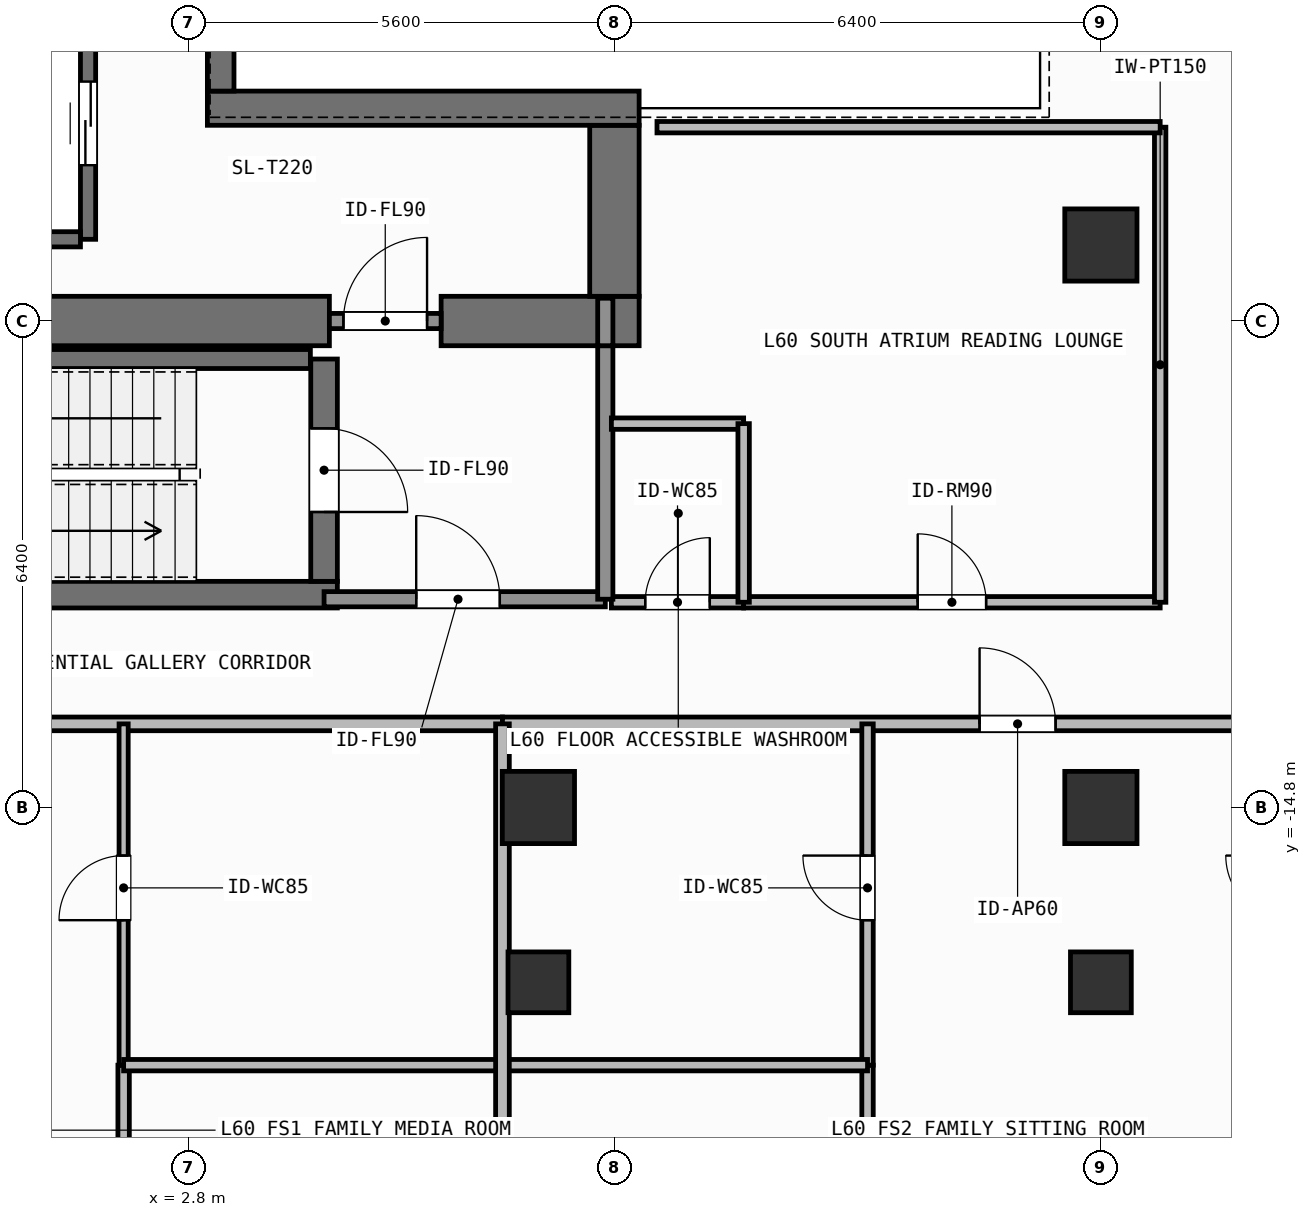
"""IFC4 building model, lengths in metres.
Left out: names, types, materials, properties, quantities, classifications, styles, units other than length and angle.
Written with IfcOpenShell. Run it as: python <this file> out.ifc"""

import sys

from ifc_helpers import new_model, si_unit, direction, frame, frame_2d, origin, origin_2d, place, context, subcontext, project, spatial, rectangle, hollow_rectangle, extrude, element, fill, save


model = new_model("IFC4")
c1 = context("Model", 3, precision=1e-05, world=origin(), true_north=direction((0.0, 1.0)))
c2 = subcontext(c1, "Body", "Model", "MODEL_VIEW")
j1 = project(units=[si_unit("LENGTHUNIT", "METRE"), si_unit("PLANEANGLEUNIT", "RADIAN")], contexts=[c1])
p1 = place(None, origin())
s1 = spatial("IfcSite", under=j1, at=p1, CompositionType="ELEMENT")
p2 = place(p1, origin())
s2 = spatial("IfcBuilding", under=s1, at=p2, CompositionType="ELEMENT")
p3 = place(p2, frame((0.0, 0.0, 246.9)))
s3 = spatial("IfcBuildingStorey", under=s2, at=p3, CompositionType="ELEMENT", Elevation=246.9)
p4 = place(p3, frame((-2.62, -8.4, 0.0), z_axis=(0.0, 0.0, 1.0), x_axis=(1.0, 0.0, 0.0)))
e1 = element("IfcWall", 1, at=p4, inside=s3, PredefinedType="SHEAR", context=c2, shape_type="SweptSolid", body=[
    extrude(rectangle(XDim=7.27, YDim=0.65, at=frame_2d((3.635, 0.0))), origin(), (0.0, 0.0, 1.0), 3.9),
])
p5 = place(p3, frame((6.12, -8.4, 0.0), z_axis=(0.0, 0.0, 1.0), x_axis=(1.0, 0.0, 0.0)))
e2 = element("IfcWall", 2, at=p5, inside=s3, PredefinedType="SHEAR", context=c2, shape_type="SweptSolid", body=[
    extrude(rectangle(XDim=2.605, YDim=0.65, at=frame_2d((1.302, 0.0))), origin(), (0.0, 0.0, 1.0), 3.9),
])
p6 = place(p3, frame((8.4, -8.075, 0.0), z_axis=(0.0, 0.0, 1.0), x_axis=(0.0, 1.0, 0.0)))
e3 = element("IfcWall", 3, at=p6, inside=s3, PredefinedType="SHEAR", context=c2, shape_type="SweptSolid", body=[
    extrude(rectangle(XDim=2.25, YDim=0.65, at=frame_2d((1.125, 0.0))), origin(), (0.0, 0.0, 1.0), 3.9),
])
p7 = place(p3, frame((3.045, -5.6, 0.0), z_axis=(0.0, 0.0, 1.0), x_axis=(1.0, 0.0, 0.0)))
e4 = element("IfcWall", 4, at=p7, inside=s3, PredefinedType="SHEAR", context=c2, shape_type="SweptSolid", body=[
    extrude(rectangle(XDim=5.68, YDim=0.45, at=frame_2d((2.84, 0.0))), origin(), (0.0, 0.0, 1.0), 3.9),
])
p8 = place(p3, frame((3.22, -5.375, 0.0), z_axis=(0.0, 0.0, 1.0), x_axis=(0.0, 1.0, 0.0)))
e5 = element("IfcWall", 5, at=p8, inside=s3, PredefinedType="SHEAR", context=c2, shape_type="SweptSolid", body=[
    extrude(rectangle(XDim=10.75, YDim=0.35, at=frame_2d((5.375, 0.0))), origin(), (0.0, 0.0, 1.0), 3.9),
])
p9 = place(p3, frame((-2.555, -12.0, 0.0), z_axis=(0.0, 0.0, 1.0), x_axis=(1.0, 0.0, 0.0)))
e6 = element("IfcWall", 6, at=p9, inside=s3, PredefinedType="SHEAR", context=c2, shape_type="SweptSolid", body=[
    extrude(rectangle(XDim=7.31, YDim=0.35, at=frame_2d((3.655, 0.0))), origin(), (0.0, 0.0, 1.0), 3.9),
])
p10 = place(p3, frame((-2.2, -8.9, 0.0), z_axis=(0.0, 0.0, 1.0), x_axis=(1.0, 0.0, 0.0)))
e7 = element("IfcWall", 7, at=p10, inside=s3, PredefinedType="SHEAR", context=c2, shape_type="SweptSolid", body=[
    extrude(rectangle(XDim=6.6, YDim=0.25, at=frame_2d((3.3, 0.0))), origin(), (0.0, 0.0, 1.0), 3.9),
])
p11 = place(p3, frame((4.58, -8.9, 0.0), z_axis=(0.0, 0.0, 1.0), x_axis=(0.0, -1.0, 0.0)))
e8 = element("IfcWall", 8, at=p11, inside=s3, PredefinedType="SHEAR", context=c2, shape_type="SweptSolid", body=[
    extrude(rectangle(XDim=2.925, YDim=0.35, at=frame_2d((1.462, 0.0))), origin(), (0.0, 0.0, 1.0), 3.9),
])
p12 = place(p11, frame((0.913, 0.0, 0.0)))
e9 = element("IfcOpeningElement", 9, at=p12, cuts=e8, PredefinedType="OPENING", context=c2, shape_type="SweptSolid", body=[
    extrude(rectangle(XDim=1.1, YDim=2.15, at=frame_2d((0.55, 1.075))), frame((0.0, 0.185, 0.0), z_axis=(0.0, -1.0, 0.0), x_axis=(1.0, 0.0, 0.0)), (0.0, 0.0, 1.0), 0.37),
])
for number, where, z_axis, x_axis in (
    (10, (7.4, -14.8, 0.0), (0.0, 0.0, 1.0), (1.0, 0.0, 0.0)),
    (11, (14.8, -14.8, 0.0), (0.0, 0.0, 1.0), (1.0, 0.0, 0.0)),
    (12, (14.8, -7.4, 0.0), (0.0, 0.0, 1.0), (1.0, 0.0, 0.0)),
):
    element("IfcColumn", number, at=place(p3, frame(where, z_axis=z_axis, x_axis=x_axis)), inside=s3, PredefinedType="COLUMN", context=c2, shape_type="SweptSolid", body=[
        extrude(rectangle(XDim=0.95, YDim=0.95, at=origin_2d()), origin(), (0.0, 0.0, 1.0), 3.9),
    ])
for number, where, z_axis, x_axis in (
    (13, (7.4, -17.1, 0.0), (0.0, 0.0, 1.0), (1.0, 0.0, 0.0)),
    (14, (14.8, -17.1, 0.0), (0.0, 0.0, 1.0), (1.0, 0.0, 0.0)),
):
    element("IfcColumn", number, at=place(p3, frame(where, z_axis=z_axis, x_axis=x_axis)), inside=s3, PredefinedType="COLUMN", context=c2, shape_type="SweptSolid", body=[
        extrude(hollow_rectangle(XDim=0.8, YDim=0.8, WallThickness=0.036, at=origin_2d()), origin(), (0.0, 0.0, 1.0), 3.9),
    ])
p13 = place(p3, frame((1.475, -7.325, 0.0), z_axis=(0.0, 0.0, 1.0), x_axis=(0.0, 1.0, 0.0)))
e15 = element("IfcWall", 15, at=p13, inside=s3, PredefinedType="SHEAR", context=c2, shape_type="SweptSolid", body=[
    extrude(rectangle(XDim=3.05, YDim=0.2, at=frame_2d((1.525, 0.0))), origin(), (0.0, 0.0, 1.0), 3.68),
])
p14 = place(p13, frame((0.975, 0.0, 0.0)))
e16 = element("IfcOpeningElement", 16, at=p14, cuts=e15, PredefinedType="OPENING", context=c2, shape_type="SweptSolid", body=[
    extrude(rectangle(XDim=1.1, YDim=2.2, at=frame_2d((0.55, 1.1))), frame((0.0, 0.11, 0.0), z_axis=(0.0, -1.0, 0.0), x_axis=(1.0, 0.0, 0.0)), (0.0, 0.0, 1.0), 0.22),
])
p15 = place(p3, frame((-0.975, -7.325, 0.0), z_axis=(0.0, 0.0, 1.0), x_axis=(1.0, 0.0, 0.0)))
e17 = element("IfcWall", 17, at=p15, inside=s3, PredefinedType="SHEAR", context=c2, shape_type="SweptSolid", body=[
    extrude(rectangle(XDim=2.35, YDim=0.2, at=frame_2d((1.175, 0.0))), origin(), (0.0, 0.0, 1.0), 3.68),
])
p16 = place(p3, frame((4.58, -12.06, 0.0), z_axis=(0.0, 0.0, 1.0), x_axis=(1.0, 0.0, 0.0)))
e18 = element("IfcWall", 18, at=p16, inside=s3, PredefinedType="SOLIDWALL", context=c2, shape_type="SweptSolid", body=[
    extrude(rectangle(XDim=3.7, YDim=0.2, at=frame_2d((1.85, 0.0))), origin(), (0.0, 0.0, 1.0), 3.68),
])
p17 = place(p16, frame((1.212, 0.0, 0.0)))
e19 = element("IfcOpeningElement", 19, at=p17, cuts=e18, PredefinedType="OPENING", context=c2, shape_type="SweptSolid", body=[
    extrude(rectangle(XDim=1.1, YDim=2.15, at=frame_2d((0.55, 1.075))), frame((0.0, 0.11, 0.0), z_axis=(0.0, -1.0, 0.0), x_axis=(1.0, 0.0, 0.0)), (0.0, 0.0, 1.0), 0.22),
])
p18 = place(p3, frame((4.65, -8.4, 0.0), z_axis=(0.0, 0.0, 1.0), x_axis=(1.0, 0.0, 0.0)))
e20 = element("IfcWall", 20, at=p18, inside=s3, PredefinedType="SOLIDWALL", context=c2, shape_type="SweptSolid", body=[
    extrude(rectangle(XDim=1.47, YDim=0.2, at=frame_2d((0.735, 0.0))), origin(), (0.0, 0.0, 1.0), 2.92),
])
p19 = place(p18, frame((0.185, 0.0, 0.0)))
e21 = element("IfcOpeningElement", 21, at=p19, cuts=e20, PredefinedType="OPENING", context=c2, shape_type="SweptSolid", body=[
    extrude(rectangle(XDim=1.1, YDim=2.15, at=frame_2d((0.55, 1.075))), frame((0.0, 0.11, 0.0), z_axis=(0.0, -1.0, 0.0), x_axis=(1.0, 0.0, 0.0)), (0.0, 0.0, 1.0), 0.22),
])
p20 = place(p3, frame((8.36, -12.1, 0.0), z_axis=(0.0, 0.0, 1.0), x_axis=(1.0, 0.0, 0.0)))
e22 = element("IfcWall", 22, at=p20, inside=s3, PredefinedType="PARTITIONING", context=c2, shape_type="SweptSolid", body=[
    extrude(rectangle(XDim=1.74, YDim=0.15, at=frame_2d((0.87, 0.0))), origin(), (0.0, 0.0, 1.0), 3.68),
])
p21 = place(p20, frame((0.445, 0.0, 0.0)))
e23 = element("IfcOpeningElement", 23, at=p21, cuts=e22, PredefinedType="OPENING", context=c2, shape_type="SweptSolid", body=[
    extrude(rectangle(XDim=0.85, YDim=2.1, at=frame_2d((0.425, 1.05))), frame((0.0, 0.085, 0.0), z_axis=(0.0, -1.0, 0.0), x_axis=(1.0, 0.0, 0.0)), (0.0, 0.0, 1.0), 0.17),
])
p22 = place(p3, frame((10.1, -12.1, 0.0), z_axis=(0.0, 0.0, 1.0), x_axis=(1.0, 0.0, 0.0)))
e24 = element("IfcWall", 24, at=p22, inside=s3, PredefinedType="PARTITIONING", context=c2, shape_type="SweptSolid", body=[
    extrude(rectangle(XDim=5.48, YDim=0.15, at=frame_2d((2.74, 0.0))), origin(), (0.0, 0.0, 1.0), 3.68),
])
p23 = place(p22, frame((2.29, 0.0, 0.0)))
e25 = element("IfcOpeningElement", 25, at=p23, cuts=e24, PredefinedType="OPENING", context=c2, shape_type="SweptSolid", body=[
    extrude(rectangle(XDim=0.9, YDim=2.1, at=frame_2d((0.45, 1.05))), frame((0.0, 0.085, 0.0), z_axis=(0.0, -1.0, 0.0), x_axis=(1.0, 0.0, 0.0)), (0.0, 0.0, 1.0), 0.17),
])
p24 = place(p3, frame((-15.02, -13.7, 0.0), z_axis=(0.0, 0.0, 1.0), x_axis=(1.0, 0.0, 0.0)))
e26 = element("IfcWall", 26, at=p24, inside=s3, PredefinedType="PARTITIONING", context=c2, shape_type="SweptSolid", body=[
    extrude(rectangle(XDim=21.947, YDim=0.18, at=frame_2d((10.974, 0.0))), origin(), (0.0, 0.0, 1.0), 3.68),
])
p25 = place(p24, frame((10.205, 0.0, 0.0)))
e27 = element("IfcOpeningElement", 27, at=p25, cuts=e26, PredefinedType="OPENING", context=c2, shape_type="SweptSolid", body=[
    extrude(rectangle(XDim=1.0, YDim=2.2, at=frame_2d((0.5, 1.1))), frame((0.0, 0.1, 0.0), z_axis=(0.0, -1.0, 0.0), x_axis=(1.0, 0.0, 0.0)), (0.0, 0.0, 1.0), 0.2),
])
p26 = place(p3, frame((1.943, -21.504, 0.0), z_axis=(0.0, 0.0, 1.0), x_axis=(0.0, 1.0, 0.0)))
e28 = element("IfcWall", 28, at=p26, inside=s3, PredefinedType="PARTITIONING", context=c2, shape_type="SweptSolid", body=[
    extrude(rectangle(XDim=3.314, YDim=0.15, at=frame_2d((1.657, 0.0))), origin(), (0.0, 0.0, 1.0), 3.68),
])
p27 = place(p26, frame((1.232, 0.0, 0.0)))
e29 = element("IfcOpeningElement", 29, at=p27, cuts=e28, PredefinedType="OPENING", context=c2, shape_type="SweptSolid", body=[
    extrude(rectangle(XDim=0.85, YDim=2.1, at=frame_2d((0.425, 1.05))), frame((0.0, 0.085, 0.0), z_axis=(0.0, -1.0, 0.0), x_axis=(1.0, 0.0, 0.0)), (0.0, 0.0, 1.0), 0.17),
])
p28 = place(p3, frame((1.943, -18.19, 0.0), z_axis=(0.0, 0.0, 1.0), x_axis=(0.0, 1.0, 0.0)))
e30 = element("IfcWall", 30, at=p28, inside=s3, PredefinedType="PARTITIONING", context=c2, shape_type="SweptSolid", body=[
    extrude(rectangle(XDim=4.49, YDim=0.12, at=frame_2d((2.245, 0.0))), origin(), (0.0, 0.0, 1.0), 3.68),
])
p29 = place(p28, frame((1.907, 0.0, 0.0)))
e31 = element("IfcOpeningElement", 31, at=p29, cuts=e30, PredefinedType="OPENING", context=c2, shape_type="SweptSolid", body=[
    extrude(rectangle(XDim=0.85, YDim=2.1, at=frame_2d((0.425, 1.05))), frame((0.0, 0.07, 0.0), z_axis=(0.0, -1.0, 0.0), x_axis=(1.0, 0.0, 0.0)), (0.0, 0.0, 1.0), 0.14),
])
p30 = place(p3, frame((6.927, -13.7, 0.0), z_axis=(0.0, 0.0, 1.0), x_axis=(1.0, 0.0, 0.0)))
e32 = element("IfcWall", 32, at=p30, inside=s3, PredefinedType="PARTITIONING", context=c2, shape_type="SweptSolid", body=[
    extrude(rectangle(XDim=15.893, YDim=0.18, at=frame_2d((7.947, 0.0))), origin(), (0.0, 0.0, 1.0), 3.68),
])
p31 = place(p30, frame((6.277, 0.0, 0.0)))
e33 = element("IfcOpeningElement", 33, at=p31, cuts=e32, PredefinedType="OPENING", context=c2, shape_type="SweptSolid", body=[
    extrude(rectangle(XDim=1.0, YDim=2.2, at=frame_2d((0.5, 1.1))), frame((0.0, 0.1, 0.0), z_axis=(0.0, -1.0, 0.0), x_axis=(1.0, 0.0, 0.0)), (0.0, 0.0, 1.0), 0.2),
])
p32 = place(p3, frame((11.73, -24.39, 0.0), z_axis=(0.0, 0.0, 1.0), x_axis=(0.0, 1.0, 0.0)))
e34 = element("IfcWall", 34, at=p32, inside=s3, PredefinedType="PARTITIONING", context=c2, shape_type="SweptSolid", body=[
    extrude(rectangle(XDim=6.2, YDim=0.15, at=frame_2d((3.1, 0.0))), origin(), (0.0, 0.0, 1.0), 3.68),
])
p33 = place(p32, frame((2.675, 0.0, 0.0)))
e35 = element("IfcOpeningElement", 35, at=p33, cuts=e34, PredefinedType="OPENING", context=c2, shape_type="SweptSolid", body=[
    extrude(rectangle(XDim=0.85, YDim=2.1, at=frame_2d((0.425, 1.05))), frame((0.0, 0.085, 0.0), z_axis=(0.0, -1.0, 0.0), x_axis=(1.0, 0.0, 0.0)), (0.0, 0.0, 1.0), 0.17),
])
p34 = place(p3, frame((11.73, -18.19, 0.0), z_axis=(0.0, 0.0, 1.0), x_axis=(0.0, 1.0, 0.0)))
e36 = element("IfcWall", 36, at=p34, inside=s3, PredefinedType="PARTITIONING", context=c2, shape_type="SweptSolid", body=[
    extrude(rectangle(XDim=4.49, YDim=0.15, at=frame_2d((2.245, 0.0))), origin(), (0.0, 0.0, 1.0), 3.68),
])
p35 = place(p34, frame((1.907, 0.0, 0.0)))
e37 = element("IfcOpeningElement", 37, at=p35, cuts=e36, PredefinedType="OPENING", context=c2, shape_type="SweptSolid", body=[
    extrude(rectangle(XDim=0.85, YDim=2.1, at=frame_2d((0.425, 1.05))), frame((0.0, 0.085, 0.0), z_axis=(0.0, -1.0, 0.0), x_axis=(1.0, 0.0, 0.0)), (0.0, 0.0, 1.0), 0.17),
])
p36 = place(p3, frame((8.28, -12.06, 0.0), z_axis=(0.0, 0.0, 1.0), x_axis=(0.0, 1.0, 0.0)))
e38 = element("IfcWall", 38, at=p36, inside=s3, PredefinedType="SOLIDWALL", context=c2, shape_type="SweptSolid", body=[
    extrude(rectangle(XDim=3.335, YDim=0.2, at=frame_2d((1.667, 0.0))), origin(), (0.0, 0.0, 1.0), 3.68),
])
p37 = place(p3, frame((8.28, -8.725, 0.0), z_axis=(0.0, 0.0, 1.0), x_axis=(0.0, 1.0, 0.0)))
e39 = element("IfcWall", 39, at=p37, inside=s3, PredefinedType="SOLIDWALL", context=c2, shape_type="SweptSolid", body=[
    extrude(rectangle(XDim=0.625, YDim=0.2, at=frame_2d((0.312, 0.0))), origin(), (0.0, 0.0, 1.0), 3.68),
])
p38 = place(p3, frame((8.36, -9.75, 0.0), z_axis=(0.0, 0.0, 1.0), x_axis=(1.0, 0.0, 0.0)))
e40 = element("IfcWall", 40, at=p38, inside=s3, PredefinedType="PARTITIONING", context=c2, shape_type="SweptSolid", body=[
    extrude(rectangle(XDim=1.74, YDim=0.15, at=frame_2d((0.87, 0.0))), origin(), (0.0, 0.0, 1.0), 3.68),
])
p39 = place(p3, frame((10.1, -12.1, 0.0), z_axis=(0.0, 0.0, 1.0), x_axis=(0.0, 1.0, 0.0)))
e41 = element("IfcWall", 41, at=p39, inside=s3, PredefinedType="PARTITIONING", context=c2, shape_type="SweptSolid", body=[
    extrude(rectangle(XDim=2.35, YDim=0.15, at=frame_2d((1.175, 0.0))), origin(), (0.0, 0.0, 1.0), 3.68),
])
p40 = place(p3, frame((15.58, -12.1, 0.0), z_axis=(0.0, 0.0, 1.0), x_axis=(0.0, 1.0, 0.0)))
e42 = element("IfcWall", 42, at=p40, inside=s3, PredefinedType="PARTITIONING", context=c2, shape_type="SweptSolid", body=[
    extrude(rectangle(XDim=6.25, YDim=0.15, at=frame_2d((3.125, 0.0))), origin(), (0.0, 0.0, 1.0), 3.68),
])
p41 = place(p3, frame((8.96, -5.85, 0.0), z_axis=(0.0, 0.0, 1.0), x_axis=(1.0, 0.0, 0.0)))
e43 = element("IfcWall", 43, at=p41, inside=s3, PredefinedType="PARTITIONING", context=c2, shape_type="SweptSolid", body=[
    extrude(rectangle(XDim=6.62, YDim=0.15, at=frame_2d((3.31, 0.0))), origin(), (0.0, 0.0, 1.0), 3.68),
])
p42 = place(p3, frame((1.943, -18.19, 0.0), z_axis=(0.0, 0.0, 1.0), x_axis=(1.0, 0.0, 0.0)))
e44 = element("IfcWall", 44, at=p42, inside=s3, PredefinedType="PARTITIONING", context=c2, shape_type="SweptSolid", body=[
    extrude(rectangle(XDim=4.984, YDim=0.15, at=frame_2d((2.492, 0.0))), origin(), (0.0, 0.0, 1.0), 3.68),
])
p43 = place(p3, frame((6.927, -18.19, 0.0), z_axis=(0.0, 0.0, 1.0), x_axis=(1.0, 0.0, 0.0)))
e45 = element("IfcWall", 45, at=p43, inside=s3, PredefinedType="PARTITIONING", context=c2, shape_type="SweptSolid", body=[
    extrude(rectangle(XDim=4.803, YDim=0.15, at=frame_2d((2.401, 0.0))), origin(), (0.0, 0.0, 1.0), 3.68),
])
p44 = place(p3, frame((6.927, -28.63, 0.0), z_axis=(0.0, 0.0, 1.0), x_axis=(0.0, 1.0, 0.0)))
e46 = element("IfcWall", 46, at=p44, inside=s3, PredefinedType="PARTITIONING", context=c2, shape_type="SweptSolid", body=[
    extrude(rectangle(XDim=14.93, YDim=0.18, at=frame_2d((7.465, 0.0))), origin(), (0.0, 0.0, 1.0), 3.68),
])
p45 = place(p14, origin())
e47 = element("IfcDoor", 47, at=p45, inside=s3, OperationType="SLIDING_TO_LEFT", PredefinedType="DOOR", context=c2, shape_type="SweptSolid", body=[
    extrude(rectangle(XDim=1.1, YDim=2.2, at=frame_2d((0.55, 1.1))), frame((0.0, 0.025, 0.0), z_axis=(0.0, -1.0, 0.0), x_axis=(1.0, 0.0, 0.0)), (0.0, 0.0, 1.0), 0.05),
])
fill(e16, e47)
p46 = place(p12, origin())
e48 = element("IfcDoor", 48, at=p46, inside=s3, OperationType="SINGLE_SWING_RIGHT", PredefinedType="DOOR", context=c2, shape_type="SweptSolid", body=[
    extrude(rectangle(XDim=1.1, YDim=2.15, at=frame_2d((0.55, 1.075))), frame((0.0, 0.025, 0.0), z_axis=(0.0, -1.0, 0.0), x_axis=(1.0, 0.0, 0.0)), (0.0, 0.0, 1.0), 0.05),
])
fill(e9, e48)
p47 = place(p17, origin())
e49 = element("IfcDoor", 49, at=p47, inside=s3, OperationType="SINGLE_SWING_LEFT", PredefinedType="DOOR", context=c2, shape_type="SweptSolid", body=[
    extrude(rectangle(XDim=1.1, YDim=2.15, at=frame_2d((0.55, 1.075))), frame((0.0, 0.025, 0.0), z_axis=(0.0, -1.0, 0.0), x_axis=(1.0, 0.0, 0.0)), (0.0, 0.0, 1.0), 0.05),
])
fill(e19, e49)
p48 = place(p19, origin())
e50 = element("IfcDoor", 50, at=p48, inside=s3, OperationType="SINGLE_SWING_RIGHT", PredefinedType="DOOR", context=c2, shape_type="SweptSolid", body=[
    extrude(rectangle(XDim=1.1, YDim=2.15, at=frame_2d((0.55, 1.075))), frame((0.0, 0.025, 0.0), z_axis=(0.0, -1.0, 0.0), x_axis=(1.0, 0.0, 0.0)), (0.0, 0.0, 1.0), 0.05),
])
fill(e21, e50)
p49 = place(p21, origin())
e51 = element("IfcDoor", 51, at=p49, inside=s3, OperationType="SINGLE_SWING_RIGHT", PredefinedType="DOOR", context=c2, shape_type="SweptSolid", body=[
    extrude(rectangle(XDim=0.85, YDim=2.1, at=frame_2d((0.425, 1.05))), frame((0.0, 0.025, 0.0), z_axis=(0.0, -1.0, 0.0), x_axis=(1.0, 0.0, 0.0)), (0.0, 0.0, 1.0), 0.05),
])
fill(e23, e51)
p50 = place(p23, origin())
e52 = element("IfcDoor", 52, at=p50, inside=s3, OperationType="SINGLE_SWING_LEFT", PredefinedType="DOOR", context=c2, shape_type="SweptSolid", body=[
    extrude(rectangle(XDim=0.9, YDim=2.1, at=frame_2d((0.45, 1.05))), frame((0.0, 0.025, 0.0), z_axis=(0.0, -1.0, 0.0), x_axis=(1.0, 0.0, 0.0)), (0.0, 0.0, 1.0), 0.05),
])
fill(e25, e52)
p51 = place(p29, origin())
e53 = element("IfcDoor", 53, at=p51, inside=s3, OperationType="SINGLE_SWING_LEFT", PredefinedType="DOOR", context=c2, shape_type="SweptSolid", body=[
    extrude(rectangle(XDim=0.85, YDim=2.1, at=frame_2d((0.425, 1.05))), frame((0.0, 0.025, 0.0), z_axis=(0.0, -1.0, 0.0), x_axis=(1.0, 0.0, 0.0)), (0.0, 0.0, 1.0), 0.05),
])
fill(e31, e53)
p52 = place(p31, origin())
e54 = element("IfcDoor", 54, at=p52, inside=s3, OperationType="SINGLE_SWING_LEFT", PredefinedType="DOOR", context=c2, shape_type="SweptSolid", body=[
    extrude(rectangle(XDim=1.0, YDim=2.2, at=frame_2d((0.5, 1.1))), frame((0.0, 0.025, 0.0), z_axis=(0.0, -1.0, 0.0), x_axis=(1.0, 0.0, 0.0)), (0.0, 0.0, 1.0), 0.05),
])
fill(e33, e54)
p53 = place(p35, origin())
e55 = element("IfcDoor", 55, at=p53, inside=s3, OperationType="SINGLE_SWING_RIGHT", PredefinedType="DOOR", context=c2, shape_type="SweptSolid", body=[
    extrude(rectangle(XDim=0.85, YDim=2.1, at=frame_2d((0.425, 1.05))), frame((0.0, 0.025, 0.0), z_axis=(0.0, -1.0, 0.0), x_axis=(1.0, 0.0, 0.0)), (0.0, 0.0, 1.0), 0.05),
])
fill(e37, e55)
save(model, sys.argv[1])
